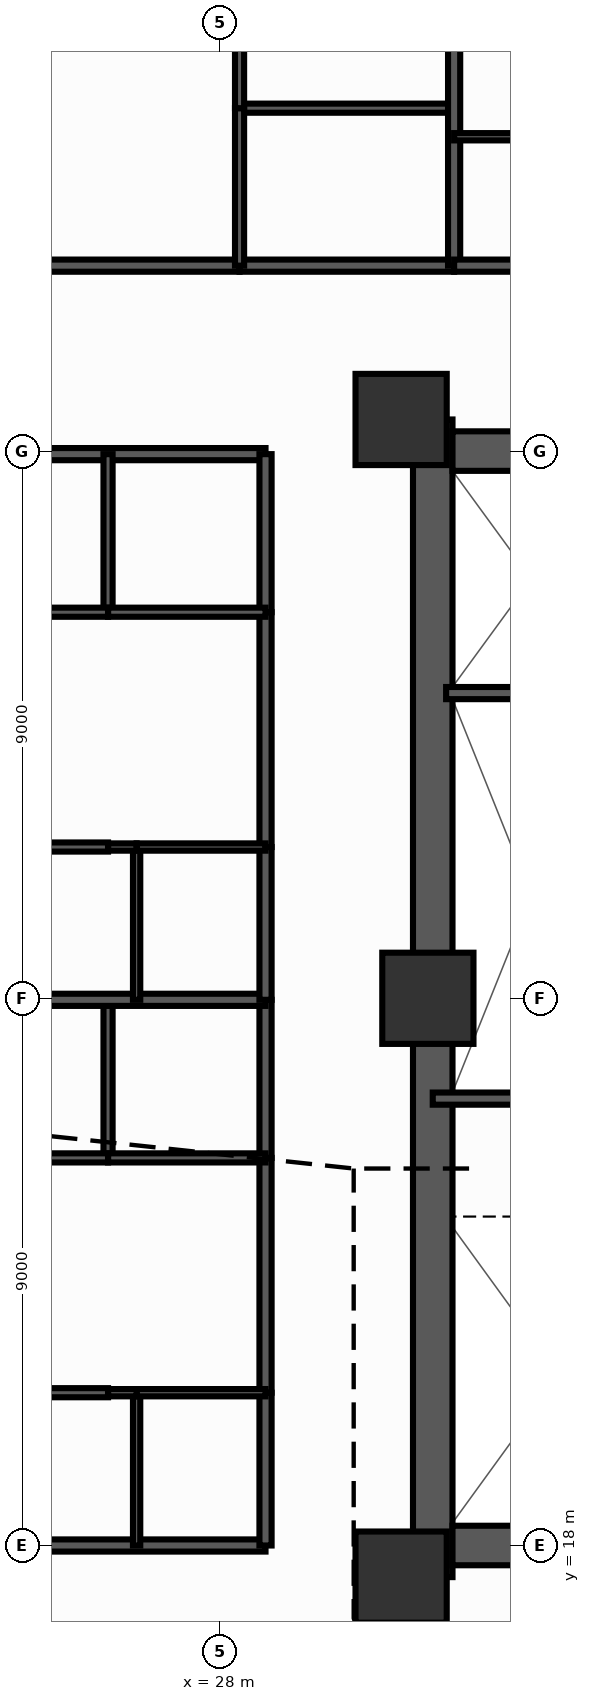
"""IFC4 building model, lengths in metres.
Left out: names, types, materials, properties, quantities, classifications, styles, units other than length and angle.
Written with IfcOpenShell. Run it as: python <this file> out.ifc"""

import sys

from ifc_helpers import new_model, si_unit, direction, frame, frame_2d, origin, origin_2d, place, context, subcontext, project, spatial, rectangle, extrude, source, transform, mapped, element, fill, save


model = new_model("IFC4")
c1 = context("Model", 3, precision=1e-05, world=origin(), true_north=direction((0.0, 1.0)))
c2 = subcontext(c1, "Body", "Model", "MODEL_VIEW")
j1 = project(units=[si_unit("LENGTHUNIT", "METRE"), si_unit("PLANEANGLEUNIT", "RADIAN")], contexts=[c1])
p1 = place(None, origin())
s1 = spatial("IfcSite", under=j1, at=p1, CompositionType="ELEMENT")
p2 = place(p1, origin())
s2 = spatial("IfcBuilding", under=s1, at=p2, CompositionType="ELEMENT")
p3 = place(p2, frame((0.0, 0.0, 19.4)))
s3 = spatial("IfcBuildingStorey", under=s2, at=p3, CompositionType="ELEMENT", Elevation=19.4)
p4 = place(p3, frame((31.5, 17.48, 0.0), z_axis=(0.0, 0.0, 1.0), x_axis=(0.0, 1.0, 0.0)))
e1 = element("IfcWall", 1, at=p4, inside=s3, PredefinedType="SHEAR", context=c2, shape_type="SweptSolid", body=[
    extrude(rectangle(XDim=19.04, YDim=0.65, at=frame_2d((9.52, 0.0))), origin(), (0.0, 0.0, 1.0), 3.0),
])
p5 = place(p4, frame((6.32, 0.0, 0.0)))
e2 = element("IfcOpeningElement", 2, at=p5, cuts=e1, PredefinedType="OPENING", context=c2, shape_type="SweptSolid", body=[
    extrude(rectangle(XDim=1.1, YDim=2.15, at=frame_2d((0.55, 1.075))), frame((0.0, 0.337, 0.0), z_axis=(0.0, -1.0, 0.0), x_axis=(1.0, 0.0, 0.0)), (0.0, 0.0, 1.0), 0.674),
])
p6 = place(p3, frame((31.825, 18.0, 0.0), z_axis=(0.0, 0.0, 1.0), x_axis=(1.0, 0.0, 0.0)))
e3 = element("IfcWall", 3, at=p6, inside=s3, PredefinedType="SHEAR", context=c2, shape_type="SweptSolid", body=[
    extrude(rectangle(XDim=12.35, YDim=0.65, at=frame_2d((6.175, 0.0))), origin(), (0.0, 0.0, 1.0), 3.0),
])
p7 = place(p3, frame((31.825, 36.0, 0.0), z_axis=(0.0, 0.0, 1.0), x_axis=(1.0, 0.0, 0.0)))
e4 = element("IfcWall", 4, at=p7, inside=s3, PredefinedType="SHEAR", context=c2, shape_type="SweptSolid", body=[
    extrude(rectangle(XDim=12.35, YDim=0.65, at=frame_2d((6.175, 0.0))), origin(), (0.0, 0.0, 1.0), 3.0),
])
p8 = place(p7, frame((5.125, 0.0, 0.0), z_axis=(0.0, 0.0, 1.0), x_axis=(-1.0, 0.0, 0.0)))
e5 = element("IfcOpeningElement", 5, at=p8, cuts=e4, PredefinedType="OPENING", context=c2, shape_type="SweptSolid", body=[
    extrude(rectangle(XDim=1.4, YDim=2.15, at=frame_2d((0.7, 1.075))), frame((0.0, 0.337, 0.0), z_axis=(0.0, -1.0, 0.0), x_axis=(1.0, 0.0, 0.0)), (0.0, 0.0, 1.0), 0.674),
])
m1 = source(origin(), c2, "Body", "SweptSolid", [
    extrude(rectangle(XDim=1.5, YDim=1.5, at=origin_2d()), origin(), (0.0, 0.0, 1.0), 3.0),
])
for number, where, z_axis, x_axis in (
    (6, (30.98, 17.48, 0.0), (0.0, 0.0, 1.0), (1.0, 0.0, 0.0)),
    (7, (30.98, 36.52, 0.0), (0.0, 0.0, 1.0), (1.0, 0.0, 0.0)),
    (8, (31.42, 27.0, 0.0), (0.0, 0.0, 1.0), (1.0, 0.0, 0.0)),
):
    element("IfcColumn", number, at=place(p3, frame(where, z_axis=z_axis, x_axis=x_axis)), inside=s3, PredefinedType="COLUMN", context=c2, shape_type="MappedRepresentation", body=[
        mapped(m1, transform((0.0, 0.0, 0.0), scale=1.0)),
    ])
p9 = place(p3, frame((31.5, 25.35, 0.0), z_axis=(0.0, 0.0, 1.0), x_axis=(1.0, 0.0, 0.0)))
e9 = element("IfcWall", 9, at=p9, inside=s3, PredefinedType="SOLIDWALL", context=c2, shape_type="SweptSolid", body=[
    extrude(rectangle(XDim=3.93, YDim=0.2, at=frame_2d((1.965, 0.0))), origin(), (0.0, 0.0, 1.0), 2.79),
])
p10 = place(p3, frame((31.72, 32.02, 0.0), z_axis=(0.0, 0.0, 1.0), x_axis=(1.0, 0.0, 0.0)))
e10 = element("IfcWall", 10, at=p10, inside=s3, PredefinedType="PARTITIONING", context=c2, shape_type="SweptSolid", body=[
    extrude(rectangle(XDim=2.8, YDim=0.2, at=frame_2d((1.4, 0.0))), origin(), (0.0, 0.0, 1.0), 2.79),
])
p11 = place(p3, frame((21.359, 39.05, 0.0), z_axis=(0.0, 0.0, 1.0), x_axis=(1.0, 0.0, 0.0)))
e11 = element("IfcWall", 11, at=p11, inside=s3, PredefinedType="PARTITIONING", context=c2, shape_type="SweptSolid", body=[
    extrude(rectangle(XDim=6.964, YDim=0.2, at=frame_2d((3.482, 0.0))), origin(), (0.0, 0.0, 1.0), 2.79),
])
p12 = place(p11, frame((2.982, 0.0, 0.0)))
e12 = element("IfcOpeningElement", 12, at=p12, cuts=e11, PredefinedType="OPENING", context=c2, shape_type="SweptSolid", body=[
    extrude(rectangle(XDim=1.0, YDim=2.15, at=frame_2d((0.5, 1.075))), frame((0.0, 0.112, 0.0), z_axis=(0.0, -1.0, 0.0), x_axis=(1.0, 0.0, 0.0)), (0.0, 0.0, 1.0), 0.224),
])
p13 = place(p3, frame((28.323, 39.05, 0.0), z_axis=(0.0, 0.0, 1.0), x_axis=(1.0, 0.0, 0.0)))
e13 = element("IfcWall", 13, at=p13, inside=s3, PredefinedType="PARTITIONING", context=c2, shape_type="SweptSolid", body=[
    extrude(rectangle(XDim=3.529, YDim=0.2, at=frame_2d((1.764, 0.0))), origin(), (0.0, 0.0, 1.0), 2.79),
])
p14 = place(p3, frame((28.323, 41.64, 0.0), z_axis=(0.0, 0.0, 1.0), x_axis=(1.0, 0.0, 0.0)))
e14 = element("IfcWall", 14, at=p14, inside=s3, PredefinedType="PARTITIONING", context=c2, shape_type="SweptSolid", body=[
    extrude(rectangle(XDim=3.529, YDim=0.15, at=frame_2d((1.764, 0.0))), origin(), (0.0, 0.0, 1.0), 2.79),
])
p15 = place(p3, frame((28.323, 39.05, 0.0), z_axis=(0.0, 0.0, 1.0), x_axis=(0.0, 1.0, 0.0)))
e15 = element("IfcWall", 15, at=p15, inside=s3, PredefinedType="PARTITIONING", context=c2, shape_type="SweptSolid", body=[
    extrude(rectangle(XDim=2.59, YDim=0.15, at=frame_2d((1.295, 0.0))), origin(), (0.0, 0.0, 1.0), 2.79),
])
p16 = place(p15, frame((0.845, 0.0, 0.0)))
e16 = element("IfcOpeningElement", 16, at=p16, cuts=e15, PredefinedType="OPENING", context=c2, shape_type="SweptSolid", body=[
    extrude(rectangle(XDim=0.9, YDim=2.1, at=frame_2d((0.45, 1.05))), frame((0.0, 0.087, 0.0), z_axis=(0.0, -1.0, 0.0), x_axis=(1.0, 0.0, 0.0)), (0.0, 0.0, 1.0), 0.174),
])
p17 = place(p3, frame((28.323, 41.64, 0.0), z_axis=(0.0, 0.0, 1.0), x_axis=(0.0, 1.0, 0.0)))
e17 = element("IfcWall", 17, at=p17, inside=s3, PredefinedType="PARTITIONING", context=c2, shape_type="SweptSolid", body=[
    extrude(rectangle(XDim=9.21, YDim=0.15, at=frame_2d((4.605, 0.0))), origin(), (0.0, 0.0, 1.0), 2.79),
])
p18 = place(p17, frame((3.829, 0.0, 0.0)))
e18 = element("IfcOpeningElement", 18, at=p18, cuts=e17, PredefinedType="OPENING", context=c2, shape_type="SweptSolid", body=[
    extrude(rectangle(XDim=0.9, YDim=2.1, at=frame_2d((0.45, 1.05))), frame((0.0, 0.087, 0.0), z_axis=(0.0, -1.0, 0.0), x_axis=(1.0, 0.0, 0.0)), (0.0, 0.0, 1.0), 0.174),
])
p19 = place(p3, frame((31.852, 39.05, 0.0), z_axis=(0.0, 0.0, 1.0), x_axis=(0.0, 1.0, 0.0)))
e19 = element("IfcWall", 19, at=p19, inside=s3, PredefinedType="PARTITIONING", context=c2, shape_type="SweptSolid", body=[
    extrude(rectangle(XDim=11.8, YDim=0.2, at=frame_2d((5.9, 0.0))), origin(), (0.0, 0.0, 1.0), 2.79),
])
p20 = place(p3, frame((31.852, 39.05, 0.0), z_axis=(0.0, 0.0, 1.0), x_axis=(1.0, 0.0, 0.0)))
e20 = element("IfcWall", 20, at=p20, inside=s3, PredefinedType="PARTITIONING", context=c2, shape_type="SweptSolid", body=[
    extrude(rectangle(XDim=2.75, YDim=0.2, at=frame_2d((1.375, 0.0))), origin(), (0.0, 0.0, 1.0), 2.79),
])
p21 = place(p3, frame((31.852, 41.17, 0.0), z_axis=(0.0, 0.0, 1.0), x_axis=(1.0, 0.0, 0.0)))
e21 = element("IfcWall", 21, at=p21, inside=s3, PredefinedType="PARTITIONING", context=c2, shape_type="SweptSolid", body=[
    extrude(rectangle(XDim=2.75, YDim=0.12, at=frame_2d((1.375, 0.0))), origin(), (0.0, 0.0, 1.0), 2.79),
])
for number, where, z_axis, x_axis in (
    (22, (28.75, 18.0, 0.0), (0.0, 0.0, 1.0), (-1.0, 0.0, 0.0)),
    (23, (28.75, 35.95, 0.0), (0.0, 0.0, 1.0), (-1.0, 0.0, 0.0)),
):
    element("IfcWall", number, at=place(p3, frame(where, z_axis=z_axis, x_axis=x_axis)), inside=s3, PredefinedType="PARTITIONING", context=c2, shape_type="SweptSolid", body=[
        extrude(rectangle(XDim=16.6, YDim=0.2, at=frame_2d((8.3, 0.0))), origin(), (0.0, 0.0, 1.0), 2.24),
    ])
p22 = place(p3, frame((28.75, 18.0, 0.0), z_axis=(0.0, 0.0, 1.0), x_axis=(0.0, 1.0, 0.0)))
e24 = element("IfcWall", 24, at=p22, inside=s3, PredefinedType="PARTITIONING", context=c2, shape_type="SweptSolid", body=[
    extrude(rectangle(XDim=2.513, YDim=0.2, at=frame_2d((1.256, 0.0))), origin(), (0.0, 0.0, 1.0), 2.79),
])
p23 = place(p3, frame((28.75, 20.513, 0.0), z_axis=(0.0, 0.0, 1.0), x_axis=(0.0, 1.0, 0.0)))
e25 = element("IfcWall", 25, at=p23, inside=s3, PredefinedType="PARTITIONING", context=c2, shape_type="SweptSolid", body=[
    extrude(rectangle(XDim=3.862, YDim=0.2, at=frame_2d((1.931, 0.0))), origin(), (0.0, 0.0, 1.0), 2.79),
])
p24 = place(p23, frame((1.431, 0.0, 0.0)))
e26 = element("IfcOpeningElement", 26, at=p24, cuts=e25, PredefinedType="OPENING", context=c2, shape_type="SweptSolid", body=[
    extrude(rectangle(XDim=1.0, YDim=2.15, at=frame_2d((0.5, 1.075))), frame((0.0, 0.112, 0.0), z_axis=(0.0, -1.0, 0.0), x_axis=(1.0, 0.0, 0.0)), (0.0, 0.0, 1.0), 0.224),
])
p25 = place(p3, frame((28.75, 24.375, 0.0), z_axis=(0.0, 0.0, 1.0), x_axis=(0.0, 1.0, 0.0)))
e27 = element("IfcWall", 27, at=p25, inside=s3, PredefinedType="PARTITIONING", context=c2, shape_type="SweptSolid", body=[
    extrude(rectangle(XDim=2.6, YDim=0.2, at=frame_2d((1.3, 0.0))), origin(), (0.0, 0.0, 1.0), 2.79),
])
p26 = place(p3, frame((26.63, 18.0, 0.0), z_axis=(0.0, 0.0, 1.0), x_axis=(0.0, 1.0, 0.0)))
e28 = element("IfcWall", 28, at=p26, inside=s3, PredefinedType="PARTITIONING", context=c2, shape_type="SweptSolid", body=[
    extrude(rectangle(XDim=2.513, YDim=0.12, at=frame_2d((1.256, 0.0))), origin(), (0.0, 0.0, 1.0), 2.79),
])
p27 = place(p3, frame((26.16, 24.375, 0.0), z_axis=(0.0, 0.0, 1.0), x_axis=(0.0, 1.0, 0.0)))
e29 = element("IfcWall", 29, at=p27, inside=s3, PredefinedType="PARTITIONING", context=c2, shape_type="SweptSolid", body=[
    extrude(rectangle(XDim=2.6, YDim=0.15, at=frame_2d((1.3, 0.0))), origin(), (0.0, 0.0, 1.0), 2.79),
])
p28 = place(p3, frame((28.75, 20.513, 0.0), z_axis=(0.0, 0.0, 1.0), x_axis=(-1.0, 0.0, 0.0)))
e30 = element("IfcWall", 30, at=p28, inside=s3, PredefinedType="PARTITIONING", context=c2, shape_type="SweptSolid", body=[
    extrude(rectangle(XDim=2.12, YDim=0.12, at=frame_2d((1.06, 0.0))), origin(), (0.0, 0.0, 1.0), 2.79),
])
p29 = place(p28, frame((0.635, 0.0, 0.0)))
e31 = element("IfcOpeningElement", 31, at=p29, cuts=e30, PredefinedType="OPENING", context=c2, shape_type="SweptSolid", body=[
    extrude(rectangle(XDim=0.85, YDim=2.05, at=frame_2d((0.425, 1.025))), frame((0.0, 0.072, 0.0), z_axis=(0.0, -1.0, 0.0), x_axis=(1.0, 0.0, 0.0)), (0.0, 0.0, 1.0), 0.144),
])
p30 = place(p3, frame((26.63, 20.513, 0.0), z_axis=(0.0, 0.0, 1.0), x_axis=(-1.0, 0.0, 0.0)))
e32 = element("IfcWall", 32, at=p30, inside=s3, PredefinedType="PARTITIONING", context=c2, shape_type="SweptSolid", body=[
    extrude(rectangle(XDim=0.47, YDim=0.12, at=frame_2d((0.235, 0.0))), origin(), (0.0, 0.0, 1.0), 2.79),
])
p31 = place(p3, frame((26.16, 20.513, 0.0), z_axis=(0.0, 0.0, 1.0), x_axis=(-1.0, 0.0, 0.0)))
e33 = element("IfcWall", 33, at=p31, inside=s3, PredefinedType="PARTITIONING", context=c2, shape_type="SweptSolid", body=[
    extrude(rectangle(XDim=14.01, YDim=0.15, at=frame_2d((7.005, 0.0))), origin(), (0.0, 0.0, 1.0), 2.79),
])
p32 = place(p31, frame((6.029, 0.0, 0.0)))
e34 = element("IfcOpeningElement", 34, at=p32, cuts=e33, PredefinedType="OPENING", context=c2, shape_type="SweptSolid", body=[
    extrude(rectangle(XDim=0.9, YDim=2.1, at=frame_2d((0.45, 1.05))), frame((0.0, 0.087, 0.0), z_axis=(0.0, -1.0, 0.0), x_axis=(1.0, 0.0, 0.0)), (0.0, 0.0, 1.0), 0.174),
])
p33 = place(p3, frame((28.75, 24.375, 0.0), z_axis=(0.0, 0.0, 1.0), x_axis=(-1.0, 0.0, 0.0)))
e35 = element("IfcWall", 35, at=p33, inside=s3, PredefinedType="PARTITIONING", context=c2, shape_type="SweptSolid", body=[
    extrude(rectangle(XDim=2.59, YDim=0.15, at=frame_2d((1.295, 0.0))), origin(), (0.0, 0.0, 1.0), 2.79),
])
p34 = place(p33, frame((0.845, 0.0, 0.0)))
e36 = element("IfcOpeningElement", 36, at=p34, cuts=e35, PredefinedType="OPENING", context=c2, shape_type="SweptSolid", body=[
    extrude(rectangle(XDim=0.9, YDim=2.1, at=frame_2d((0.45, 1.05))), frame((0.0, 0.087, 0.0), z_axis=(0.0, -1.0, 0.0), x_axis=(1.0, 0.0, 0.0)), (0.0, 0.0, 1.0), 0.174),
])
p35 = place(p3, frame((26.16, 24.375, 0.0), z_axis=(0.0, 0.0, 1.0), x_axis=(-1.0, 0.0, 0.0)))
e37 = element("IfcWall", 37, at=p35, inside=s3, PredefinedType="PARTITIONING", context=c2, shape_type="SweptSolid", body=[
    extrude(rectangle(XDim=14.01, YDim=0.15, at=frame_2d((7.005, 0.0))), origin(), (0.0, 0.0, 1.0), 2.79),
])
p36 = place(p35, frame((6.029, 0.0, 0.0)))
e38 = element("IfcOpeningElement", 38, at=p36, cuts=e37, PredefinedType="OPENING", context=c2, shape_type="SweptSolid", body=[
    extrude(rectangle(XDim=0.9, YDim=2.1, at=frame_2d((0.45, 1.05))), frame((0.0, 0.087, 0.0), z_axis=(0.0, -1.0, 0.0), x_axis=(1.0, 0.0, 0.0)), (0.0, 0.0, 1.0), 0.174),
])
p37 = place(p3, frame((28.75, 26.975, 0.0), z_axis=(0.0, 0.0, 1.0), x_axis=(-1.0, 0.0, 0.0)))
e39 = element("IfcWall", 39, at=p37, inside=s3, PredefinedType="PARTITIONING", context=c2, shape_type="SweptSolid", body=[
    extrude(rectangle(XDim=16.6, YDim=0.2, at=frame_2d((8.3, 0.0))), origin(), (0.0, 0.0, 1.0), 2.79),
])
p38 = place(p3, frame((28.75, 26.975, 0.0), z_axis=(0.0, 0.0, 1.0), x_axis=(0.0, 1.0, 0.0)))
e40 = element("IfcWall", 40, at=p38, inside=s3, PredefinedType="PARTITIONING", context=c2, shape_type="SweptSolid", body=[
    extrude(rectangle(XDim=2.513, YDim=0.2, at=frame_2d((1.256, 0.0))), origin(), (0.0, 0.0, 1.0), 2.79),
])
p39 = place(p3, frame((28.75, 29.488, 0.0), z_axis=(0.0, 0.0, 1.0), x_axis=(0.0, 1.0, 0.0)))
e41 = element("IfcWall", 41, at=p39, inside=s3, PredefinedType="PARTITIONING", context=c2, shape_type="SweptSolid", body=[
    extrude(rectangle(XDim=3.862, YDim=0.2, at=frame_2d((1.931, 0.0))), origin(), (0.0, 0.0, 1.0), 2.79),
])
p40 = place(p39, frame((1.431, 0.0, 0.0)))
e42 = element("IfcOpeningElement", 42, at=p40, cuts=e41, PredefinedType="OPENING", context=c2, shape_type="SweptSolid", body=[
    extrude(rectangle(XDim=1.0, YDim=2.15, at=frame_2d((0.5, 1.075))), frame((0.0, 0.112, 0.0), z_axis=(0.0, -1.0, 0.0), x_axis=(1.0, 0.0, 0.0)), (0.0, 0.0, 1.0), 0.224),
])
p41 = place(p3, frame((28.75, 33.35, 0.0), z_axis=(0.0, 0.0, 1.0), x_axis=(0.0, 1.0, 0.0)))
e43 = element("IfcWall", 43, at=p41, inside=s3, PredefinedType="PARTITIONING", context=c2, shape_type="SweptSolid", body=[
    extrude(rectangle(XDim=2.6, YDim=0.2, at=frame_2d((1.3, 0.0))), origin(), (0.0, 0.0, 1.0), 2.79),
])
p42 = place(p3, frame((26.63, 26.975, 0.0), z_axis=(0.0, 0.0, 1.0), x_axis=(0.0, 1.0, 0.0)))
e44 = element("IfcWall", 44, at=p42, inside=s3, PredefinedType="PARTITIONING", context=c2, shape_type="SweptSolid", body=[
    extrude(rectangle(XDim=2.513, YDim=0.12, at=frame_2d((1.256, 0.0))), origin(), (0.0, 0.0, 1.0), 2.79),
])
p43 = place(p3, frame((26.16, 33.35, 0.0), z_axis=(0.0, 0.0, 1.0), x_axis=(0.0, 1.0, 0.0)))
e45 = element("IfcWall", 45, at=p43, inside=s3, PredefinedType="PARTITIONING", context=c2, shape_type="SweptSolid", body=[
    extrude(rectangle(XDim=2.6, YDim=0.15, at=frame_2d((1.3, 0.0))), origin(), (0.0, 0.0, 1.0), 2.79),
])
p44 = place(p3, frame((28.75, 29.488, 0.0), z_axis=(0.0, 0.0, 1.0), x_axis=(-1.0, 0.0, 0.0)))
e46 = element("IfcWall", 46, at=p44, inside=s3, PredefinedType="PARTITIONING", context=c2, shape_type="SweptSolid", body=[
    extrude(rectangle(XDim=2.12, YDim=0.12, at=frame_2d((1.06, 0.0))), origin(), (0.0, 0.0, 1.0), 2.79),
])
p45 = place(p44, frame((0.635, 0.0, 0.0)))
e47 = element("IfcOpeningElement", 47, at=p45, cuts=e46, PredefinedType="OPENING", context=c2, shape_type="SweptSolid", body=[
    extrude(rectangle(XDim=0.85, YDim=2.05, at=frame_2d((0.425, 1.025))), frame((0.0, 0.072, 0.0), z_axis=(0.0, -1.0, 0.0), x_axis=(1.0, 0.0, 0.0)), (0.0, 0.0, 1.0), 0.144),
])
p46 = place(p3, frame((26.63, 29.488, 0.0), z_axis=(0.0, 0.0, 1.0), x_axis=(-1.0, 0.0, 0.0)))
e48 = element("IfcWall", 48, at=p46, inside=s3, PredefinedType="PARTITIONING", context=c2, shape_type="SweptSolid", body=[
    extrude(rectangle(XDim=0.47, YDim=0.12, at=frame_2d((0.235, 0.0))), origin(), (0.0, 0.0, 1.0), 2.79),
])
p47 = place(p3, frame((26.16, 29.488, 0.0), z_axis=(0.0, 0.0, 1.0), x_axis=(-1.0, 0.0, 0.0)))
e49 = element("IfcWall", 49, at=p47, inside=s3, PredefinedType="PARTITIONING", context=c2, shape_type="SweptSolid", body=[
    extrude(rectangle(XDim=14.01, YDim=0.15, at=frame_2d((7.005, 0.0))), origin(), (0.0, 0.0, 1.0), 2.79),
])
p48 = place(p47, frame((6.029, 0.0, 0.0)))
e50 = element("IfcOpeningElement", 50, at=p48, cuts=e49, PredefinedType="OPENING", context=c2, shape_type="SweptSolid", body=[
    extrude(rectangle(XDim=0.9, YDim=2.1, at=frame_2d((0.45, 1.05))), frame((0.0, 0.087, 0.0), z_axis=(0.0, -1.0, 0.0), x_axis=(1.0, 0.0, 0.0)), (0.0, 0.0, 1.0), 0.174),
])
p49 = place(p3, frame((28.75, 33.35, 0.0), z_axis=(0.0, 0.0, 1.0), x_axis=(-1.0, 0.0, 0.0)))
e51 = element("IfcWall", 51, at=p49, inside=s3, PredefinedType="PARTITIONING", context=c2, shape_type="SweptSolid", body=[
    extrude(rectangle(XDim=2.59, YDim=0.15, at=frame_2d((1.295, 0.0))), origin(), (0.0, 0.0, 1.0), 2.79),
])
p50 = place(p49, frame((0.845, 0.0, 0.0)))
e52 = element("IfcOpeningElement", 52, at=p50, cuts=e51, PredefinedType="OPENING", context=c2, shape_type="SweptSolid", body=[
    extrude(rectangle(XDim=0.9, YDim=2.1, at=frame_2d((0.45, 1.05))), frame((0.0, 0.087, 0.0), z_axis=(0.0, -1.0, 0.0), x_axis=(1.0, 0.0, 0.0)), (0.0, 0.0, 1.0), 0.174),
])
p51 = place(p3, frame((26.16, 33.35, 0.0), z_axis=(0.0, 0.0, 1.0), x_axis=(-1.0, 0.0, 0.0)))
e53 = element("IfcWall", 53, at=p51, inside=s3, PredefinedType="PARTITIONING", context=c2, shape_type="SweptSolid", body=[
    extrude(rectangle(XDim=14.01, YDim=0.15, at=frame_2d((7.005, 0.0))), origin(), (0.0, 0.0, 1.0), 2.79),
])
p52 = place(p51, frame((6.029, 0.0, 0.0)))
e54 = element("IfcOpeningElement", 54, at=p52, cuts=e53, PredefinedType="OPENING", context=c2, shape_type="SweptSolid", body=[
    extrude(rectangle(XDim=0.9, YDim=2.1, at=frame_2d((0.45, 1.05))), frame((0.0, 0.087, 0.0), z_axis=(0.0, -1.0, 0.0), x_axis=(1.0, 0.0, 0.0)), (0.0, 0.0, 1.0), 0.174),
])
m2 = source(origin(), c2, "Body", "SweptSolid", [
    extrude(rectangle(XDim=1.1, YDim=2.15, at=frame_2d((0.55, 1.075))), frame((0.0, 0.025, 0.0), z_axis=(0.0, -1.0, 0.0), x_axis=(1.0, 0.0, 0.0)), (0.0, 0.0, 1.0), 0.05),
])
p53 = place(p5, origin())
e55 = element("IfcDoor", 55, at=p53, inside=s3, OperationType="SINGLE_SWING_LEFT", PredefinedType="DOOR", context=c2, shape_type="MappedRepresentation", body=[
    mapped(m2, transform((0.0, 0.0, 0.0), scale=1.0)),
])
fill(e2, e55)
m3 = source(origin(), c2, "Body", "SweptSolid", [
    extrude(rectangle(XDim=1.0, YDim=2.15, at=frame_2d((0.5, 1.075))), frame((0.0, 0.025, 0.0), z_axis=(0.0, -1.0, 0.0), x_axis=(1.0, 0.0, 0.0)), (0.0, 0.0, 1.0), 0.05),
])
p54 = place(p12, origin())
e56 = element("IfcDoor", 56, at=p54, inside=s3, OperationType="SINGLE_SWING_RIGHT", PredefinedType="DOOR", context=c2, shape_type="MappedRepresentation", body=[
    mapped(m3, transform((0.0, 0.0, 0.0), scale=1.0)),
])
fill(e12, e56)
m4 = source(origin(), c2, "Body", "SweptSolid", [
    extrude(rectangle(XDim=0.9, YDim=2.1, at=frame_2d((0.45, 1.05))), frame((0.0, 0.025, 0.0), z_axis=(0.0, -1.0, 0.0), x_axis=(1.0, 0.0, 0.0)), (0.0, 0.0, 1.0), 0.05),
])
p55 = place(p16, origin())
e57 = element("IfcDoor", 57, at=p55, inside=s3, OperationType="SINGLE_SWING_LEFT", PredefinedType="DOOR", context=c2, shape_type="MappedRepresentation", body=[
    mapped(m4, transform((0.0, 0.0, 0.0), scale=1.0)),
])
fill(e16, e57)
p56 = place(p24, origin())
e58 = element("IfcDoor", 58, at=p56, inside=s3, OperationType="SINGLE_SWING_RIGHT", PredefinedType="DOOR", context=c2, shape_type="MappedRepresentation", body=[
    mapped(m3, transform((0.0, 0.0, 0.0), scale=1.0)),
])
fill(e26, e58)
m5 = source(origin(), c2, "Body", "SweptSolid", [
    extrude(rectangle(XDim=0.85, YDim=2.05, at=frame_2d((0.425, 1.025))), frame((0.0, 0.025, 0.0), z_axis=(0.0, -1.0, 0.0), x_axis=(1.0, 0.0, 0.0)), (0.0, 0.0, 1.0), 0.05),
])
p57 = place(p29, origin())
e59 = element("IfcDoor", 59, at=p57, inside=s3, OperationType="SINGLE_SWING_LEFT", PredefinedType="DOOR", context=c2, shape_type="MappedRepresentation", body=[
    mapped(m5, transform((0.0, 0.0, 0.0), scale=1.0)),
])
fill(e31, e59)
p58 = place(p34, origin())
e60 = element("IfcDoor", 60, at=p58, inside=s3, OperationType="SINGLE_SWING_LEFT", PredefinedType="DOOR", context=c2, shape_type="MappedRepresentation", body=[
    mapped(m4, transform((0.0, 0.0, 0.0), scale=1.0)),
])
fill(e36, e60)
p59 = place(p40, origin())
e61 = element("IfcDoor", 61, at=p59, inside=s3, OperationType="SINGLE_SWING_LEFT", PredefinedType="DOOR", context=c2, shape_type="MappedRepresentation", body=[
    mapped(m3, transform((0.0, 0.0, 0.0), scale=1.0)),
])
fill(e42, e61)
p60 = place(p45, origin())
e62 = element("IfcDoor", 62, at=p60, inside=s3, OperationType="SINGLE_SWING_RIGHT", PredefinedType="DOOR", context=c2, shape_type="MappedRepresentation", body=[
    mapped(m5, transform((0.0, 0.0, 0.0), scale=1.0)),
])
fill(e47, e62)
p61 = place(p50, origin())
e63 = element("IfcDoor", 63, at=p61, inside=s3, OperationType="SINGLE_SWING_RIGHT", PredefinedType="DOOR", context=c2, shape_type="MappedRepresentation", body=[
    mapped(m4, transform((0.0, 0.0, 0.0), scale=1.0)),
])
fill(e52, e63)
save(model, sys.argv[1])
